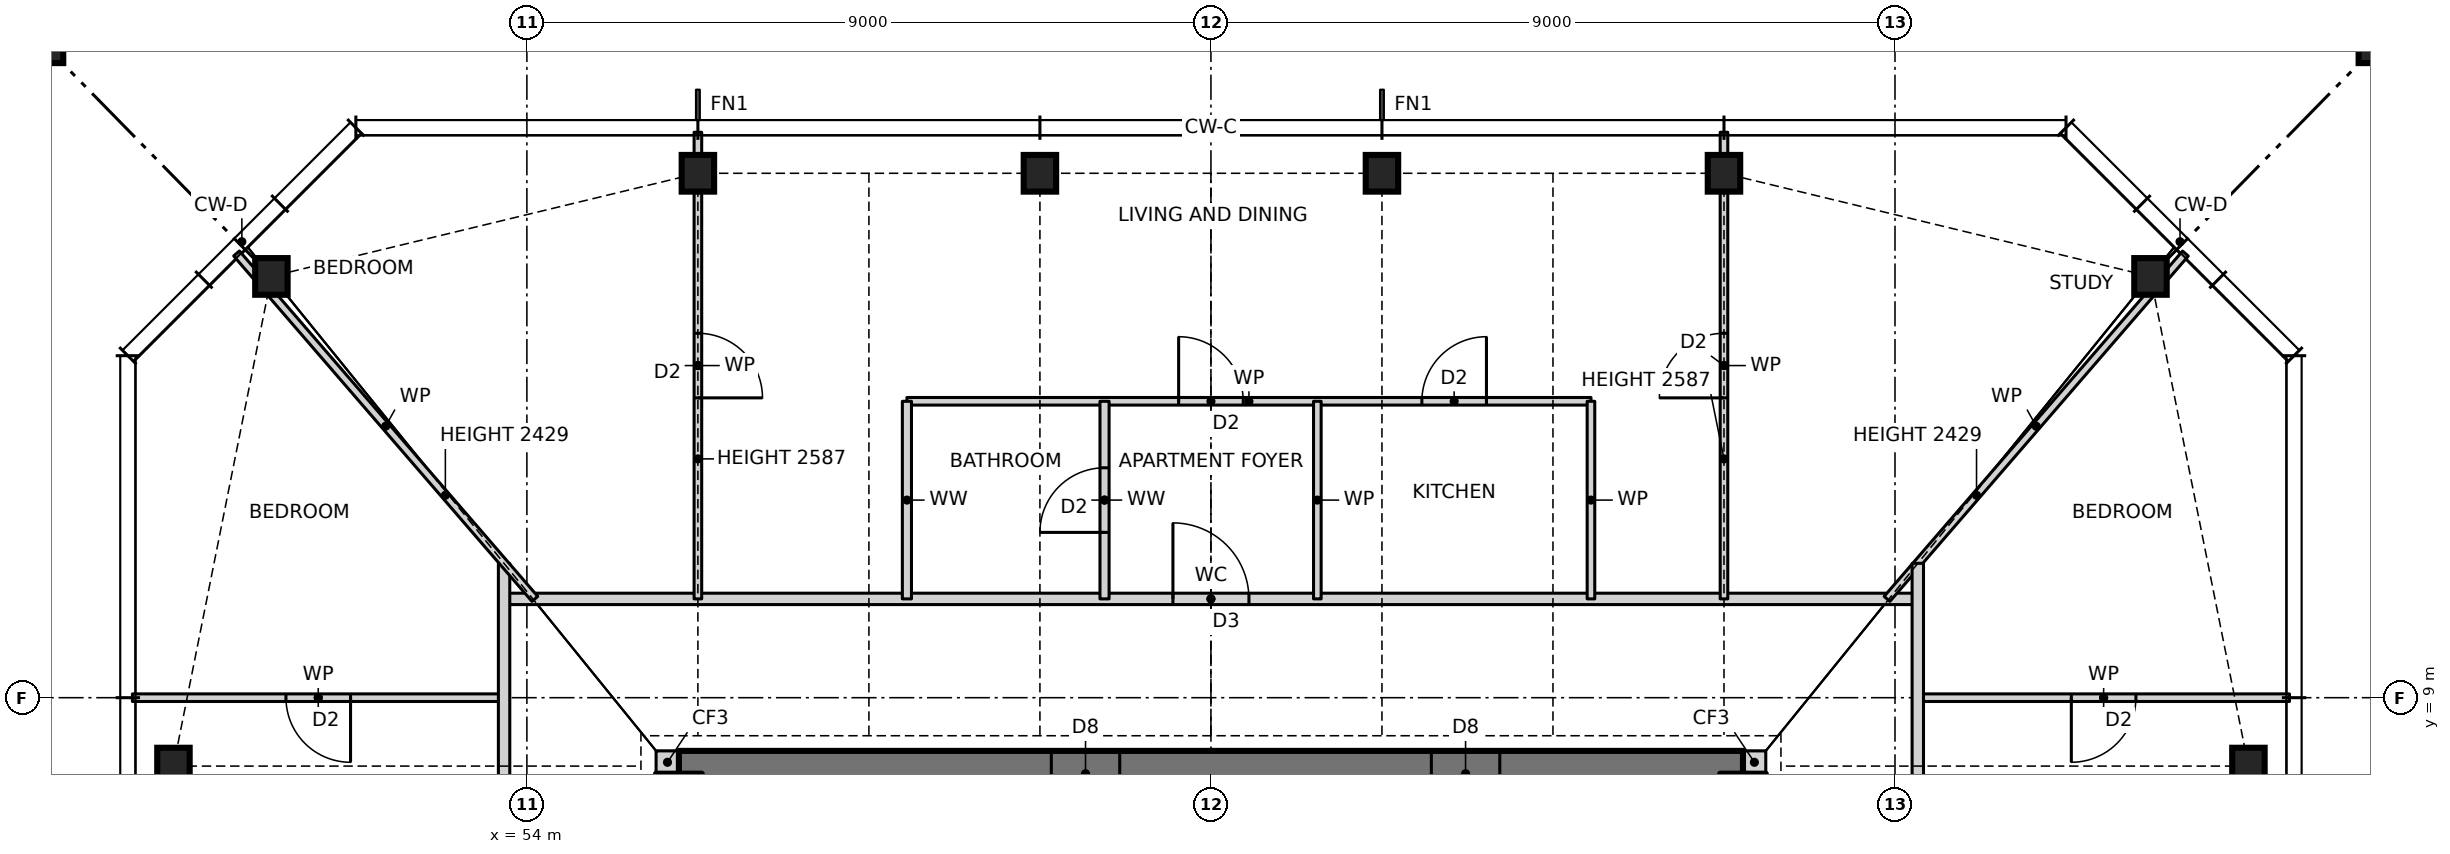
"""IFC4 building model, lengths in metres.
Left out: names, types, materials, properties, quantities, classifications, styles, units other than length and angle.
Written with IfcOpenShell. Run it as: python <this file> out.ifc"""

import sys

from ifc_helpers import new_model, si_unit, direction, frame, frame_2d, origin, origin_2d, place, context, subcontext, project, spatial, rectangle, hollow_rectangle, i_section, extrude, element, fill, save


model = new_model("IFC4")
c1 = context("Model", 3, precision=1e-05, world=origin(), true_north=direction((0.0, 1.0)))
c2 = subcontext(c1, "Body", "Model", "MODEL_VIEW")
j1 = project(units=[si_unit("LENGTHUNIT", "METRE"), si_unit("PLANEANGLEUNIT", "RADIAN")], contexts=[c1])
p1 = place(None, origin())
s1 = spatial("IfcSite", under=j1, at=p1, CompositionType="ELEMENT")
p2 = place(p1, origin())
s2 = spatial("IfcBuilding", under=s1, at=p2, CompositionType="ELEMENT")
p3 = place(p2, frame((0.0, 0.0, 119.0)))
s3 = spatial("IfcBuildingStorey", under=s2, at=p3, CompositionType="ELEMENT", Elevation=119.0)
for number, where, z_axis, x_axis in (
    (1, (76.65, 8.1, 0.0), (0.0, 0.0, 1.0), (1.0, 0.0, 0.0)),
    (2, (75.361, 14.543, 0.0), (0.0, 0.0, 1.0), (1.0, 0.0, 0.0)),
    (3, (69.75, 15.9, 0.0), (0.0, 0.0, 1.0), (1.0, 0.0, 0.0)),
    (4, (65.25, 15.9, 0.0), (0.0, 0.0, 1.0), (1.0, 0.0, 0.0)),
    (5, (60.75, 15.9, 0.0), (0.0, 0.0, 1.0), (1.0, 0.0, 0.0)),
    (6, (56.25, 15.9, 0.0), (0.0, 0.0, 1.0), (1.0, 0.0, 0.0)),
    (7, (50.639, 14.543, 0.0), (0.0, 0.0, 1.0), (1.0, 0.0, 0.0)),
    (8, (49.35, 8.1, 0.0), (0.0, 0.0, 1.0), (1.0, 0.0, 0.0)),
):
    element("IfcColumn", number, at=place(p3, frame(where, z_axis=z_axis, x_axis=x_axis)), inside=s3, PredefinedType="COLUMN", context=c2, shape_type="SweptSolid", body=[
        extrude(i_section(OverallWidth=0.427, OverallDepth=0.483, WebThickness=0.051, FlangeThickness=0.082, at=origin_2d()), origin(), (0.0, 0.0, 1.0), 3.5),
    ])
for number, where, z_axis, x_axis in (
    (9, (78.65, 17.9, 0.0), (0.0, 0.0, 1.0), (1.0, 0.0, 0.0)),
    (10, (47.35, 17.9, 0.0), (0.0, 0.0, 1.0), (1.0, 0.0, 0.0)),
):
    element("IfcColumn", number, at=place(p3, frame(where, z_axis=z_axis, x_axis=x_axis)), inside=s3, PredefinedType="COLUMN", context=c2, shape_type="SweptSolid", body=[
        extrude(hollow_rectangle(XDim=1.1, YDim=1.1, WallThickness=0.06, at=origin_2d()), origin(), (0.0, 0.0, 1.0), 3.5),
    ])
for number, where, z_axis, x_axis in (
    (11, (70.0, 8.15, 0.0), (0.0, 0.0, 1.0), (1.0, 0.0, 0.0)),
    (12, (55.7, 8.15, 0.0), (0.0, 0.0, 1.0), (1.0, 0.0, 0.0)),
):
    element("IfcWall", number, at=place(p3, frame(where, z_axis=z_axis, x_axis=x_axis)), inside=s3, PredefinedType="SOLIDWALL", context=c2, shape_type="SweptSolid", body=[
        extrude(rectangle(XDim=0.3, YDim=0.3, at=frame_2d((0.15, 0.0))), origin(), (0.0, 0.0, 1.0), 3.5),
    ])
p4 = place(p3, frame((70.0, 8.0, 0.0), z_axis=(0.0, 0.0, 1.0), x_axis=(-1.0, 0.0, 0.0)))
e13 = element("IfcWall", 13, at=p4, inside=s3, PredefinedType="SHEAR", context=c2, shape_type="SweptSolid", body=[
    extrude(rectangle(XDim=14.0, YDim=0.6, at=frame_2d((7.0, 0.0))), origin(), (0.0, 0.0, 1.0), 3.5),
])
p5 = place(p4, frame((8.2, 0.0, 0.0)))
e14 = element("IfcOpeningElement", 14, at=p5, cuts=e13, PredefinedType="OPENING", context=c2, shape_type="SweptSolid", body=[
    extrude(rectangle(XDim=0.9, YDim=2.1, at=frame_2d((0.45, 1.05))), frame((0.0, 0.31, 0.0), z_axis=(0.0, -1.0, 0.0), x_axis=(1.0, 0.0, 0.0)), (0.0, 0.0, 1.0), 0.62),
])
p6 = place(p4, frame((3.2, 0.0, 0.0)))
e15 = element("IfcOpeningElement", 15, at=p6, cuts=e13, PredefinedType="OPENING", context=c2, shape_type="SweptSolid", body=[
    extrude(rectangle(XDim=0.9, YDim=2.1, at=frame_2d((0.45, 1.05))), frame((0.0, 0.31, 0.0), z_axis=(0.0, -1.0, 0.0), x_axis=(1.0, 0.0, 0.0)), (0.0, 0.0, 1.0), 0.62),
])
p7 = place(p3, frame((48.81, 9.0, 0.0), z_axis=(0.0, 0.0, 1.0), x_axis=(1.0, 0.0, 0.0)))
e16 = element("IfcWall", 16, at=p7, inside=s3, PredefinedType="PARTITIONING", context=c2, shape_type="SweptSolid", body=[
    extrude(rectangle(XDim=4.89, YDim=0.1, at=frame_2d((2.445, 0.0))), origin(), (0.0, 0.0, 1.0), 3.27),
])
p8 = place(p7, frame((2.02, 0.0, 0.0)))
e17 = element("IfcOpeningElement", 17, at=p8, cuts=e16, PredefinedType="OPENING", context=c2, shape_type="SweptSolid", body=[
    extrude(rectangle(XDim=0.85, YDim=2.1, at=frame_2d((0.425, 1.05))), frame((0.0, 0.06, 0.0), z_axis=(0.0, -1.0, 0.0), x_axis=(1.0, 0.0, 0.0)), (0.0, 0.0, 1.0), 0.12),
])
p9 = place(p3, frame((72.3, 9.0, 0.0), z_axis=(0.0, 0.0, 1.0), x_axis=(1.0, 0.0, 0.0)))
e18 = element("IfcWall", 18, at=p9, inside=s3, PredefinedType="PARTITIONING", context=c2, shape_type="SweptSolid", body=[
    extrude(rectangle(XDim=4.89, YDim=0.1, at=frame_2d((2.445, 0.0))), origin(), (0.0, 0.0, 1.0), 3.27),
])
p10 = place(p9, frame((2.02, 0.0, 0.0)))
e19 = element("IfcOpeningElement", 19, at=p10, cuts=e18, PredefinedType="OPENING", context=c2, shape_type="SweptSolid", body=[
    extrude(rectangle(XDim=0.85, YDim=2.1, at=frame_2d((0.425, 1.05))), frame((0.0, 0.06, 0.0), z_axis=(0.0, -1.0, 0.0), x_axis=(1.0, 0.0, 0.0)), (0.0, 0.0, 1.0), 0.12),
])
p11 = place(p3, frame((53.7, 10.3, 0.0), z_axis=(0.0, 0.0, 1.0), x_axis=(1.0, 0.0, 0.0)))
e20 = element("IfcWall", 20, at=p11, inside=s3, PredefinedType="PARTITIONING", context=c2, shape_type="SweptSolid", body=[
    extrude(rectangle(XDim=18.6, YDim=0.15, at=frame_2d((9.3, 0.0))), origin(), (0.0, 0.0, 1.0), 3.27),
])
p12 = place(p11, frame((8.8, 0.0, 0.0)))
e21 = element("IfcOpeningElement", 21, at=p12, cuts=e20, PredefinedType="OPENING", context=c2, shape_type="SweptSolid", body=[
    extrude(rectangle(XDim=1.0, YDim=2.1, at=frame_2d((0.5, 1.05))), frame((0.0, 0.085, 0.0), z_axis=(0.0, -1.0, 0.0), x_axis=(1.0, 0.0, 0.0)), (0.0, 0.0, 1.0), 0.17),
])
p13 = place(p3, frame((59.0, 12.9, 0.0), z_axis=(0.0, 0.0, 1.0), x_axis=(1.0, 0.0, 0.0)))
e22 = element("IfcWall", 22, at=p13, inside=s3, PredefinedType="PARTITIONING", context=c2, shape_type="SweptSolid", body=[
    extrude(rectangle(XDim=9.0, YDim=0.1, at=frame_2d((4.5, 0.0))), origin(), (0.0, 0.0, 1.0), 3.27),
])
p14 = place(p13, frame((6.775, 0.0, 0.0)))
e23 = element("IfcOpeningElement", 23, at=p14, cuts=e22, PredefinedType="OPENING", context=c2, shape_type="SweptSolid", body=[
    extrude(rectangle(XDim=0.85, YDim=2.1, at=frame_2d((0.425, 1.05))), frame((0.0, 0.06, 0.0), z_axis=(0.0, -1.0, 0.0), x_axis=(1.0, 0.0, 0.0)), (0.0, 0.0, 1.0), 0.12),
])
p15 = place(p13, frame((3.575, 0.0, 0.0)))
e24 = element("IfcOpeningElement", 24, at=p15, cuts=e22, PredefinedType="OPENING", context=c2, shape_type="SweptSolid", body=[
    extrude(rectangle(XDim=0.85, YDim=2.1, at=frame_2d((0.425, 1.05))), frame((0.0, 0.06, 0.0), z_axis=(0.0, -1.0, 0.0), x_axis=(1.0, 0.0, 0.0)), (0.0, 0.0, 1.0), 0.12),
])
p16 = place(p3, frame((71.895, 10.3, 0.0), z_axis=(0.0, 0.0, 1.0), x_axis=(0.65378286253, 0.756682211144, 0.0)))
e25 = element("IfcWall", 25, at=p16, inside=s3, PredefinedType="PARTITIONING", context=c2, shape_type="SweptSolid", body=[
    extrude(rectangle(XDim=6.005, YDim=0.1, at=frame_2d((3.002, 0.0))), origin(), (0.0, 0.0, 1.0), 2.429),
])
p17 = place(p3, frame((72.3, -10.9, 0.0), z_axis=(0.0, 0.0, 1.0), x_axis=(0.0, 1.0, 0.0)))
e26 = element("IfcWall", 26, at=p17, inside=s3, PredefinedType="PARTITIONING", context=c2, shape_type="SweptSolid", body=[
    extrude(rectangle(XDim=21.668, YDim=0.15, at=frame_2d((10.834, 0.0))), origin(), (0.0, 0.0, 1.0), 3.27),
])
p18 = place(p17, frame((10.4, 0.0, 0.0)))
e27 = element("IfcOpeningElement", 27, at=p18, cuts=e26, PredefinedType="OPENING", context=c2, shape_type="SweptSolid", body=[
    extrude(rectangle(XDim=1.0, YDim=2.1, at=frame_2d((0.5, 1.05))), frame((0.0, 0.085, 0.0), z_axis=(0.0, -1.0, 0.0), x_axis=(1.0, 0.0, 0.0)), (0.0, 0.0, 1.0), 0.17),
])
p19 = place(p3, frame((69.75, 10.3, 0.0), z_axis=(0.0, 0.0, 1.0), x_axis=(0.0, 1.0, 0.0)))
e28 = element("IfcWall", 28, at=p19, inside=s3, PredefinedType="PARTITIONING", context=c2, shape_type="SweptSolid", body=[
    extrude(rectangle(XDim=6.14, YDim=0.1, at=frame_2d((3.07, 0.0))), origin(), (0.0, 0.0, 1.0), 2.587),
])
p20 = place(p19, frame((2.645, 0.0, 0.0)))
e29 = element("IfcOpeningElement", 29, at=p20, cuts=e28, PredefinedType="OPENING", context=c2, shape_type="SweptSolid", body=[
    extrude(rectangle(XDim=0.85, YDim=2.1, at=frame_2d((0.425, 1.05))), frame((0.0, 0.06, 0.0), z_axis=(0.0, -1.0, 0.0), x_axis=(1.0, 0.0, 0.0)), (0.0, 0.0, 1.0), 0.12),
])
for number, where, z_axis, x_axis in (
    (30, (68.0, 10.3, 0.0), (0.0, 0.0, 1.0), (0.0, 1.0, 0.0)),
    (31, (64.4, 10.3, 0.0), (0.0, 0.0, 1.0), (0.0, 1.0, 0.0)),
):
    element("IfcWall", number, at=place(p3, frame(where, z_axis=z_axis, x_axis=x_axis)), inside=s3, PredefinedType="PARTITIONING", context=c2, shape_type="SweptSolid", body=[
        extrude(rectangle(XDim=2.6, YDim=0.1, at=frame_2d((1.3, 0.0))), origin(), (0.0, 0.0, 1.0), 3.27),
    ])
p21 = place(p3, frame((61.6, 10.3, 0.0), z_axis=(0.0, 0.0, 1.0), x_axis=(0.0, 1.0, 0.0)))
e32 = element("IfcWall", 32, at=p21, inside=s3, PredefinedType="PARTITIONING", context=c2, shape_type="SweptSolid", body=[
    extrude(rectangle(XDim=2.6, YDim=0.12, at=frame_2d((1.3, 0.0))), origin(), (0.0, 0.0, 1.0), 3.27),
])
p22 = place(p21, frame((0.875, 0.0, 0.0)))
e33 = element("IfcOpeningElement", 33, at=p22, cuts=e32, PredefinedType="OPENING", context=c2, shape_type="SweptSolid", body=[
    extrude(rectangle(XDim=0.85, YDim=2.1, at=frame_2d((0.425, 1.05))), frame((0.0, 0.07, 0.0), z_axis=(0.0, -1.0, 0.0), x_axis=(1.0, 0.0, 0.0)), (0.0, 0.0, 1.0), 0.14),
])
p23 = place(p3, frame((59.0, 10.3, 0.0), z_axis=(0.0, 0.0, 1.0), x_axis=(0.0, 1.0, 0.0)))
e34 = element("IfcWall", 34, at=p23, inside=s3, PredefinedType="PARTITIONING", context=c2, shape_type="SweptSolid", body=[
    extrude(rectangle(XDim=2.6, YDim=0.12, at=frame_2d((1.3, 0.0))), origin(), (0.0, 0.0, 1.0), 3.27),
])
p24 = place(p3, frame((56.25, 10.3, 0.0), z_axis=(0.0, 0.0, 1.0), x_axis=(0.0, 1.0, 0.0)))
e35 = element("IfcWall", 35, at=p24, inside=s3, PredefinedType="PARTITIONING", context=c2, shape_type="SweptSolid", body=[
    extrude(rectangle(XDim=6.14, YDim=0.1, at=frame_2d((3.07, 0.0))), origin(), (0.0, 0.0, 1.0), 2.587),
])
p25 = place(p24, frame((2.645, 0.0, 0.0)))
e36 = element("IfcOpeningElement", 36, at=p25, cuts=e35, PredefinedType="OPENING", context=c2, shape_type="SweptSolid", body=[
    extrude(rectangle(XDim=0.85, YDim=2.1, at=frame_2d((0.425, 1.05))), frame((0.0, 0.06, 0.0), z_axis=(0.0, -1.0, 0.0), x_axis=(1.0, 0.0, 0.0)), (0.0, 0.0, 1.0), 0.12),
])
p26 = place(p3, frame((53.7, -10.9, 0.0), z_axis=(0.0, 0.0, 1.0), x_axis=(0.0, 1.0, 0.0)))
e37 = element("IfcWall", 37, at=p26, inside=s3, PredefinedType="PARTITIONING", context=c2, shape_type="SweptSolid", body=[
    extrude(rectangle(XDim=21.668, YDim=0.15, at=frame_2d((10.834, 0.0))), origin(), (0.0, 0.0, 1.0), 3.27),
])
p27 = place(p26, frame((10.4, 0.0, 0.0)))
e38 = element("IfcOpeningElement", 38, at=p27, cuts=e37, PredefinedType="OPENING", context=c2, shape_type="SweptSolid", body=[
    extrude(rectangle(XDim=1.0, YDim=2.1, at=frame_2d((0.5, 1.05))), frame((0.0, 0.085, 0.0), z_axis=(0.0, -1.0, 0.0), x_axis=(1.0, 0.0, 0.0)), (0.0, 0.0, 1.0), 0.17),
])
p28 = place(p3, frame((54.105, 10.3, 0.0), z_axis=(0.0, 0.0, 1.0), x_axis=(-0.653606109319, 0.756834892074, 0.0)))
e39 = element("IfcWall", 39, at=p28, inside=s3, PredefinedType="PARTITIONING", context=c2, shape_type="SweptSolid", body=[
    extrude(rectangle(XDim=6.005, YDim=0.1, at=frame_2d((3.002, 0.0))), origin(), (0.0, 0.0, 1.0), 2.429),
])
p29 = place(p10, frame((0.85, 0.0, 0.0), z_axis=(0.0, 0.0, 1.0), x_axis=(-1.0, 0.0, 0.0)))
e40 = element("IfcDoor", 40, at=p29, inside=s3, OperationType="SINGLE_SWING_RIGHT", PredefinedType="DOOR", context=c2, shape_type="SweptSolid", body=[
    extrude(rectangle(XDim=0.85, YDim=2.1, at=frame_2d((0.425, 1.05))), frame((0.0, 0.025, 0.0), z_axis=(0.0, -1.0, 0.0), x_axis=(1.0, 0.0, 0.0)), (0.0, 0.0, 1.0), 0.05),
])
fill(e19, e40)
p30 = place(p14, origin())
e41 = element("IfcDoor", 41, at=p30, inside=s3, OperationType="SINGLE_SWING_RIGHT", PredefinedType="DOOR", context=c2, shape_type="SweptSolid", body=[
    extrude(rectangle(XDim=0.85, YDim=2.1, at=frame_2d((0.425, 1.05))), frame((0.0, 0.025, 0.0), z_axis=(0.0, -1.0, 0.0), x_axis=(1.0, 0.0, 0.0)), (0.0, 0.0, 1.0), 0.05),
])
fill(e23, e41)
p31 = place(p12, origin())
e42 = element("IfcDoor", 42, at=p31, inside=s3, OperationType="SINGLE_SWING_LEFT", PredefinedType="DOOR", context=c2, shape_type="SweptSolid", body=[
    extrude(rectangle(XDim=1.0, YDim=2.1, at=frame_2d((0.5, 1.05))), frame((0.0, 0.025, 0.0), z_axis=(0.0, -1.0, 0.0), x_axis=(1.0, 0.0, 0.0)), (0.0, 0.0, 1.0), 0.05),
])
fill(e21, e42)
p32 = place(p15, origin())
e43 = element("IfcDoor", 43, at=p32, inside=s3, OperationType="SINGLE_SWING_LEFT", PredefinedType="DOOR", context=c2, shape_type="SweptSolid", body=[
    extrude(rectangle(XDim=0.85, YDim=2.1, at=frame_2d((0.425, 1.05))), frame((0.0, 0.025, 0.0), z_axis=(0.0, -1.0, 0.0), x_axis=(1.0, 0.0, 0.0)), (0.0, 0.0, 1.0), 0.05),
])
fill(e24, e43)
p33 = place(p22, origin())
e44 = element("IfcDoor", 44, at=p33, inside=s3, OperationType="SINGLE_SWING_LEFT", PredefinedType="DOOR", context=c2, shape_type="SweptSolid", body=[
    extrude(rectangle(XDim=0.85, YDim=2.1, at=frame_2d((0.425, 1.05))), frame((0.0, 0.025, 0.0), z_axis=(0.0, -1.0, 0.0), x_axis=(1.0, 0.0, 0.0)), (0.0, 0.0, 1.0), 0.05),
])
fill(e33, e44)
p34 = place(p20, origin())
e45 = element("IfcDoor", 45, at=p34, inside=s3, OperationType="SINGLE_SWING_LEFT", PredefinedType="DOOR", context=c2, shape_type="SweptSolid", body=[
    extrude(rectangle(XDim=0.85, YDim=2.1, at=frame_2d((0.425, 1.05))), frame((0.0, 0.025, 0.0), z_axis=(0.0, -1.0, 0.0), x_axis=(1.0, 0.0, 0.0)), (0.0, 0.0, 1.0), 0.05),
])
fill(e29, e45)
p35 = place(p25, frame((0.85, 0.0, 0.0), z_axis=(0.0, 0.0, 1.0), x_axis=(-1.0, 0.0, 0.0)))
e46 = element("IfcDoor", 46, at=p35, inside=s3, OperationType="SINGLE_SWING_RIGHT", PredefinedType="DOOR", context=c2, shape_type="SweptSolid", body=[
    extrude(rectangle(XDim=0.85, YDim=2.1, at=frame_2d((0.425, 1.05))), frame((0.0, 0.025, 0.0), z_axis=(0.0, -1.0, 0.0), x_axis=(1.0, 0.0, 0.0)), (0.0, 0.0, 1.0), 0.05),
])
fill(e36, e46)
p36 = place(p8, frame((0.85, 0.0, 0.0), z_axis=(0.0, 0.0, 1.0), x_axis=(-1.0, 0.0, 0.0)))
e47 = element("IfcDoor", 47, at=p36, inside=s3, OperationType="SINGLE_SWING_LEFT", PredefinedType="DOOR", context=c2, shape_type="SweptSolid", body=[
    extrude(rectangle(XDim=0.85, YDim=2.1, at=frame_2d((0.425, 1.05))), frame((0.0, 0.025, 0.0), z_axis=(0.0, -1.0, 0.0), x_axis=(1.0, 0.0, 0.0)), (0.0, 0.0, 1.0), 0.05),
])
fill(e17, e47)
p37 = place(p5, origin())
e48 = element("IfcDoor", 48, at=p37, inside=s3, OperationType="SINGLE_SWING_RIGHT", PredefinedType="DOOR", context=c2, shape_type="SweptSolid", body=[
    extrude(rectangle(XDim=0.9, YDim=2.1, at=frame_2d((0.45, 1.05))), frame((0.0, 0.025, 0.0), z_axis=(0.0, -1.0, 0.0), x_axis=(1.0, 0.0, 0.0)), (0.0, 0.0, 1.0), 0.05),
])
fill(e14, e48)
p38 = place(p6, origin())
e49 = element("IfcDoor", 49, at=p38, inside=s3, OperationType="SINGLE_SWING_RIGHT", PredefinedType="DOOR", context=c2, shape_type="SweptSolid", body=[
    extrude(rectangle(XDim=0.9, YDim=2.1, at=frame_2d((0.45, 1.05))), frame((0.0, 0.025, 0.0), z_axis=(0.0, -1.0, 0.0), x_axis=(1.0, 0.0, 0.0)), (0.0, 0.0, 1.0), 0.05),
])
fill(e15, e49)
save(model, sys.argv[1])
